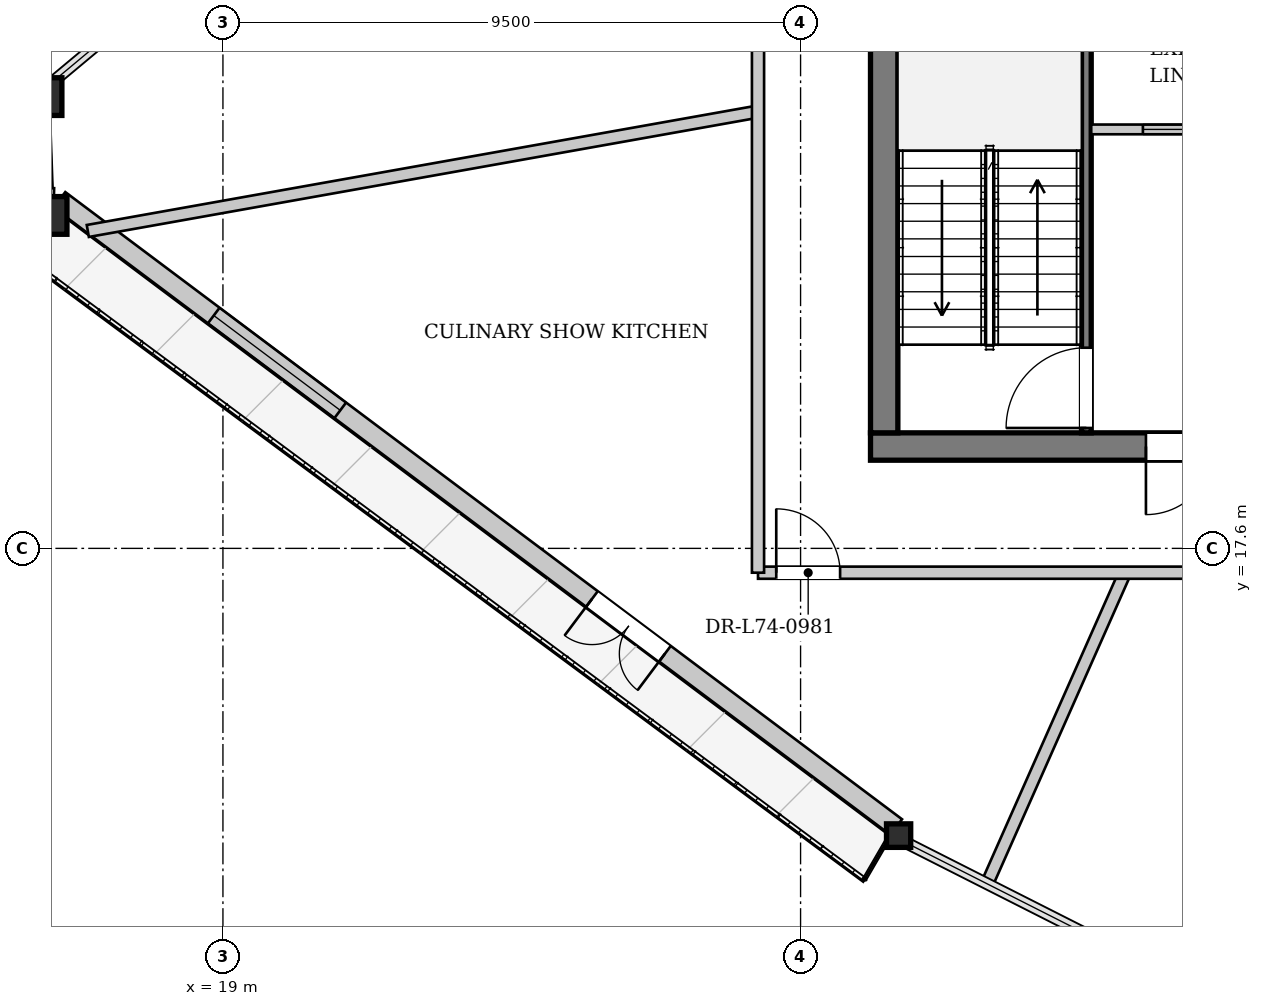
"""IFC4 building model, lengths in metres.
Left out: names, types, materials, properties, quantities, classifications, styles, units other than length and angle.
Written with IfcOpenShell. Run it as: python <this file> out.ifc"""

import sys

from ifc_helpers import new_model, si_unit, direction, frame, frame_2d, origin, origin_2d, place, context, subcontext, project, spatial, rectangle, i_section, extrude, source, transform, mapped, element, fill, save


model = new_model("IFC4")
c1 = context("Model", 3, precision=1e-05, world=origin(), true_north=direction((0.0, 1.0)))
c2 = subcontext(c1, "Body", "Model", "MODEL_VIEW")
j1 = project(units=[si_unit("LENGTHUNIT", "METRE"), si_unit("PLANEANGLEUNIT", "RADIAN")], contexts=[c1])
p1 = place(None, origin())
s1 = spatial("IfcSite", under=j1, at=p1, CompositionType="ELEMENT")
p2 = place(p1, origin())
s2 = spatial("IfcBuilding", under=s1, at=p2, CompositionType="ELEMENT")
p3 = place(p2, frame((0.0, 0.0, 277.7)))
s3 = spatial("IfcBuildingStorey", under=s2, at=p3, CompositionType="ELEMENT", Elevation=277.7)
m1 = source(origin(), c2, "Body", "SweptSolid", [
    extrude(i_section(OverallWidth=0.305, OverallDepth=0.62, WebThickness=0.021, FlangeThickness=0.04, at=origin_2d()), origin(), (0.0, 0.0, 1.0), 3.956),
])
p4 = place(p3, frame((16.145, 25.227, 0.0), z_axis=(0.027522629563, -0.099661539784, 0.99464068002), x_axis=(0.963918716253, 0.266196747646, 0.0)))
e1 = element("IfcColumn", 1, at=p4, inside=s3, PredefinedType="COLUMN", context=c2, shape_type="MappedRepresentation", body=[
    mapped(m1, transform((0.0, 0.0, 0.0), x_axis=(1.0, 0.0, 0.0), y_axis=(0.0, 1.0, 0.0), z_axis=(0.0, 0.0, 1.0), scale=1.0)),
])
m2 = source(origin(), c2, "Body", "SweptSolid", [
    extrude(i_section(OverallWidth=0.305, OverallDepth=0.62, WebThickness=0.021, FlangeThickness=0.04, at=origin_2d()), origin(), (0.0, 0.0, 1.0), 3.946),
])
p5 = place(p3, frame((16.215, 23.204, 0.0), z_axis=(0.033907558739, -0.065092612761, 0.997302977647), x_axis=(0.886885299691, 0.461989680828, 0.0)))
e2 = element("IfcColumn", 2, at=p5, inside=s3, PredefinedType="COLUMN", context=c2, shape_type="MappedRepresentation", body=[
    mapped(m2, transform((0.0, 0.0, 0.0), x_axis=(1.0, 0.0, 0.0), y_axis=(0.0, 1.0, 0.0), z_axis=(0.0, 0.0, 1.0), scale=1.0)),
])
m3 = source(origin(), c2, "Body", "SweptSolid", [
    extrude(i_section(OverallWidth=0.398, OverallDepth=0.387, WebThickness=0.019, FlangeThickness=0.029, at=origin_2d()), origin(), (0.0, 0.0, 1.0), 3.945),
])
p6 = place(p3, frame((29.977, 12.889, 0.0), z_axis=(0.068826100896, -0.006560761416, 0.997607099135), x_axis=(0.094893585197, 0.995487422064, 0.0)))
e3 = element("IfcColumn", 3, at=p6, inside=s3, PredefinedType="COLUMN", context=c2, shape_type="MappedRepresentation", body=[
    mapped(m3, transform((0.0, 0.0, 0.0), x_axis=(1.0, 0.0, 0.0), y_axis=(0.0, 1.0, 0.0), z_axis=(0.0, 0.0, 1.0), scale=1.0)),
])
p7 = place(p3, frame((30.073, 13.017, 0.0), z_axis=(0.0, 0.0, 1.0), x_axis=(-0.800180538876, 0.599759206018, 0.0)))
e4 = element("IfcWall", 4, at=p7, inside=s3, PredefinedType="SOLIDWALL", context=c2, shape_type="SweptSolid", body=[
    extrude(rectangle(XDim=17.198, YDim=0.32, at=frame_2d((8.599, 0.0))), origin(), (0.0, 0.0, 1.0), 3.462),
])
p8 = place(p7, frame((4.753, 0.0, 0.0)))
e5 = element("IfcOpeningElement", 5, at=p8, cuts=e4, PredefinedType="OPENING", context=c2, shape_type="SweptSolid", body=[
    extrude(rectangle(XDim=1.5, YDim=2.3, at=frame_2d((0.75, 1.15))), frame((0.0, 0.17, 0.0), z_axis=(0.0, -1.0, 0.0), x_axis=(1.0, 0.0, 0.0)), (0.0, 0.0, 1.0), 0.34),
])
p9 = place(p7, frame((11.426, 0.0, 0.65)))
e6 = element("IfcOpeningElement", 6, at=p9, cuts=e4, PredefinedType="OPENING", context=c2, shape_type="SweptSolid", body=[
    extrude(rectangle(XDim=2.6, YDim=2.35, at=frame_2d((1.3, 1.175))), frame((0.0, 0.17, 0.0), z_axis=(0.0, -1.0, 0.0), x_axis=(1.0, 0.0, 0.0)), (0.0, 0.0, 1.0), 0.34),
])
p10 = place(p3, frame((16.219, 23.364, 0.0), z_axis=(0.0, 0.0, 1.0), x_axis=(-0.999633757941, 0.027061965649, 0.0)))
e7 = element("IfcWall", 7, at=p10, inside=s3, PredefinedType="SOLIDWALL", context=c2, shape_type="SweptSolid", body=[
    extrude(rectangle(XDim=2.355, YDim=0.32, at=frame_2d((1.177, 0.0))), origin(), (0.0, 0.0, 1.0), 3.462),
])
p11 = place(p3, frame((13.966, 23.146, 0.0), z_axis=(0.0, 0.0, 1.0), x_axis=(0.758861199742, 0.651252393106, 0.0)))
e8 = element("IfcWall", 8, at=p11, inside=s3, PredefinedType="SOLIDWALL", context=c2, shape_type="SweptSolid", body=[
    extrude(rectangle(XDim=3.008, YDim=0.32, at=frame_2d((1.504, 0.0))), origin(), (0.0, 0.0, 1.0), 3.462),
])
p12 = place(p3, frame((46.35, 19.275, 0.0), z_axis=(0.0, 0.0, 1.0), x_axis=(-1.0, 0.0, 0.0)))
e9 = element("IfcWall", 9, at=p12, inside=s3, PredefinedType="SHEAR", context=c2, shape_type="SweptSolid", body=[
    extrude(rectangle(XDim=16.7, YDim=0.45, at=frame_2d((8.35, 0.0))), origin(), (0.0, 0.0, 1.0), 3.92),
])
p13 = place(p12, frame((4.55, 0.0, 0.0)))
e10 = element("IfcOpeningElement", 10, at=p13, cuts=e9, PredefinedType="OPENING", context=c2, shape_type="SweptSolid", body=[
    extrude(rectangle(XDim=1.12, YDim=2.25, at=frame_2d((0.56, 1.125))), frame((0.0, 0.235, 0.0), z_axis=(0.0, -1.0, 0.0), x_axis=(1.0, 0.0, 0.0)), (0.0, 0.0, 1.0), 0.47),
])
p14 = place(p12, frame((11.05, 0.0, 0.0)))
e11 = element("IfcOpeningElement", 11, at=p14, cuts=e9, PredefinedType="OPENING", context=c2, shape_type="SweptSolid", body=[
    extrude(rectangle(XDim=1.12, YDim=2.25, at=frame_2d((0.56, 1.125))), frame((0.0, 0.235, 0.0), z_axis=(0.0, -1.0, 0.0), x_axis=(1.0, 0.0, 0.0)), (0.0, 0.0, 1.0), 0.47),
])
p15 = place(p3, frame((29.875, 19.5, 0.0), z_axis=(0.0, 0.0, 1.0), x_axis=(0.0, 1.0, 0.0)))
e12 = element("IfcWall", 12, at=p15, inside=s3, PredefinedType="SHEAR", context=c2, shape_type="SweptSolid", body=[
    extrude(rectangle(XDim=14.2, YDim=0.45, at=frame_2d((7.1, 0.0))), origin(), (0.0, 0.0, 1.0), 3.92),
])
p16 = place(p15, frame((7.42, 0.0, 0.0)))
e13 = element("IfcOpeningElement", 13, at=p16, cuts=e12, PredefinedType="OPENING", context=c2, shape_type="SweptSolid", body=[
    extrude(rectangle(XDim=1.6, YDim=2.2, at=frame_2d((0.8, 1.1))), frame((0.0, 0.235, 0.0), z_axis=(0.0, -1.0, 0.0), x_axis=(1.0, 0.0, 0.0)), (0.0, 0.0, 1.0), 0.47),
])
p17 = place(p3, frame((33.2, 19.5, 0.0), z_axis=(0.0, 0.0, 1.0), x_axis=(0.0, 1.0, 0.0)))
e14 = element("IfcWall", 14, at=p17, inside=s3, PredefinedType="PARTITIONING", context=c2, shape_type="SweptSolid", body=[
    extrude(rectangle(XDim=7.46, YDim=0.16, at=frame_2d((3.73, 0.0))), origin(), (0.0, 0.0, 1.0), 3.92),
])
p18 = place(p17, frame((0.08, 0.0, 0.0)))
e15 = element("IfcOpeningElement", 15, at=p18, cuts=e14, PredefinedType="OPENING", context=c2, shape_type="SweptSolid", body=[
    extrude(rectangle(XDim=1.32, YDim=2.2, at=frame_2d((0.66, 1.1))), frame((0.0, 0.09, 0.0), z_axis=(0.0, -1.0, 0.0), x_axis=(1.0, 0.0, 0.0)), (0.0, 0.0, 1.0), 0.18),
])
p19 = place(p3, frame((33.28, 24.49, 0.0), z_axis=(0.0, 0.0, 1.0), x_axis=(1.0, 0.0, 0.0)))
e16 = element("IfcWall", 16, at=p19, inside=s3, PredefinedType="PARTITIONING", context=c2, shape_type="SweptSolid", body=[
    extrude(rectangle(XDim=9.44, YDim=0.16, at=frame_2d((4.72, 0.0))), origin(), (0.0, 0.0, 1.0), 3.92),
])
p20 = place(p19, frame((0.85, 0.0, 0.95)))
e17 = element("IfcOpeningElement", 17, at=p20, cuts=e16, PredefinedType="OPENING", context=c2, shape_type="SweptSolid", body=[
    extrude(rectangle(XDim=1.4, YDim=1.8, at=frame_2d((0.7, 0.9))), frame((0.0, 0.09, 0.0), z_axis=(0.0, -1.0, 0.0), x_axis=(1.0, 0.0, 0.0)), (0.0, 0.0, 1.0), 0.18),
])
p21 = place(p3, frame((27.8, 24.783, 0.0), z_axis=(0.0, 0.0, 1.0), x_axis=(-0.98449973, -0.175386093036, 0.0)))
e18 = element("IfcWall", 18, at=p21, inside=s3, PredefinedType="PARTITIONING", context=c2, shape_type="SweptSolid", body=[
    extrude(rectangle(XDim=11.196, YDim=0.2, at=frame_2d((5.598, 0.0))), origin(), (0.0, 0.0, 1.0), 3.92),
])
p22 = place(p3, frame((33.834, 17.2, 0.0), z_axis=(0.0, 0.0, 1.0), x_axis=(-0.405145139192, -0.914252381014, 0.0)))
e19 = element("IfcWall", 19, at=p22, inside=s3, PredefinedType="PARTITIONING", context=c2, shape_type="SweptSolid", body=[
    extrude(rectangle(XDim=5.566, YDim=0.2, at=frame_2d((2.783, 0.0))), origin(), (0.0, 0.0, 1.0), 3.92),
])
p23 = place(p3, frame((27.8, 17.2, 0.0), z_axis=(0.0, 0.0, 1.0), x_axis=(1.0, 0.0, 0.0)))
e20 = element("IfcWall", 20, at=p23, inside=s3, PredefinedType="PARTITIONING", context=c2, shape_type="SweptSolid", body=[
    extrude(rectangle(XDim=20.4, YDim=0.2, at=frame_2d((10.2, 0.0))), origin(), (0.0, 0.0, 1.0), 3.92),
])
p24 = place(p23, frame((0.3, 0.0, 0.0)))
e21 = element("IfcOpeningElement", 21, at=p24, cuts=e20, PredefinedType="OPENING", context=c2, shape_type="SweptSolid", body=[
    extrude(rectangle(XDim=1.05, YDim=2.2, at=frame_2d((0.525, 1.1))), frame((0.0, 0.11, 0.0), z_axis=(0.0, -1.0, 0.0), x_axis=(1.0, 0.0, 0.0)), (0.0, 0.0, 1.0), 0.22),
])
p25 = place(p23, frame((11.805, 0.0, 0.0)))
e22 = element("IfcOpeningElement", 22, at=p25, cuts=e20, PredefinedType="OPENING", context=c2, shape_type="SweptSolid", body=[
    extrude(rectangle(XDim=1.05, YDim=2.2, at=frame_2d((0.525, 1.1))), frame((0.0, 0.11, 0.0), z_axis=(0.0, -1.0, 0.0), x_axis=(1.0, 0.0, 0.0)), (0.0, 0.0, 1.0), 0.22),
])
p26 = place(p23, frame((19.05, 0.0, 0.0)))
e23 = element("IfcOpeningElement", 23, at=p26, cuts=e20, PredefinedType="OPENING", context=c2, shape_type="SweptSolid", body=[
    extrude(rectangle(XDim=1.05, YDim=2.2, at=frame_2d((0.525, 1.1))), frame((0.0, 0.11, 0.0), z_axis=(0.0, -1.0, 0.0), x_axis=(1.0, 0.0, 0.0)), (0.0, 0.0, 1.0), 0.22),
])
p27 = place(p3, frame((27.8, 17.2, 0.0), z_axis=(0.0, 0.0, 1.0), x_axis=(0.0, 1.0, 0.0)))
e24 = element("IfcWall", 24, at=p27, inside=s3, PredefinedType="PARTITIONING", context=c2, shape_type="SweptSolid", body=[
    extrude(rectangle(XDim=17.714, YDim=0.2, at=frame_2d((8.857, 0.0))), origin(), (0.0, 0.0, 1.0), 3.92),
])
p28 = place(p27, frame((11.972, 0.0, 0.0)))
e25 = element("IfcOpeningElement", 25, at=p28, cuts=e24, PredefinedType="OPENING", context=c2, shape_type="SweptSolid", body=[
    extrude(rectangle(XDim=1.05, YDim=2.2, at=frame_2d((0.525, 1.1))), frame((0.0, 0.11, 0.0), z_axis=(0.0, -1.0, 0.0), x_axis=(1.0, 0.0, 0.0)), (0.0, 0.0, 1.0), 0.22),
])
m4 = source(origin(), c2, "Body", "SweptSolid", [
    extrude(rectangle(XDim=1.5, YDim=2.3, at=frame_2d((0.75, 1.15))), frame((0.0, 0.025, 0.0), z_axis=(0.0, -1.0, 0.0), x_axis=(1.0, 0.0, 0.0)), (0.0, 0.0, 1.0), 0.05),
])
p29 = place(p8, origin())
e26 = element("IfcDoor", 26, at=p29, inside=s3, OperationType="DOUBLE_DOOR_SINGLE_SWING", PredefinedType="DOOR", context=c2, shape_type="MappedRepresentation", body=[
    mapped(m4, transform((0.0, 0.0, 0.0), x_axis=(1.0, 0.0, 0.0), y_axis=(0.0, 1.0, 0.0), z_axis=(0.0, 0.0, 1.0), scale=1.0)),
])
fill(e5, e26)
m5 = source(origin(), c2, "Body", "SweptSolid", [
    extrude(rectangle(XDim=2.6, YDim=2.35, at=frame_2d((1.3, 1.175))), frame((0.0, 0.03, 0.0), z_axis=(0.0, -1.0, 0.0), x_axis=(1.0, 0.0, 0.0)), (0.0, 0.0, 1.0), 0.06),
])
p30 = place(p9, origin())
e27 = element("IfcWindow", 27, at=p30, inside=s3, PartitioningType="SINGLE_PANEL", PredefinedType="WINDOW", context=c2, shape_type="MappedRepresentation", body=[
    mapped(m5, transform((0.0, 0.0, 0.0), x_axis=(1.0, 0.0, 0.0), y_axis=(0.0, 1.0, 0.0), z_axis=(0.0, 0.0, 1.0), scale=1.0)),
])
fill(e6, e27)
m6 = source(origin(), c2, "Body", "SweptSolid", [
    extrude(rectangle(XDim=1.12, YDim=2.25, at=frame_2d((0.56, 1.125))), frame((0.0, 0.025, 0.0), z_axis=(0.0, -1.0, 0.0), x_axis=(1.0, 0.0, 0.0)), (0.0, 0.0, 1.0), 0.05),
])
p31 = place(p14, origin())
e28 = element("IfcDoor", 28, at=p31, inside=s3, OperationType="SINGLE_SWING_RIGHT", PredefinedType="DOOR", context=c2, shape_type="MappedRepresentation", body=[
    mapped(m6, transform((0.0, 0.0, 0.0), x_axis=(1.0, 0.0, 0.0), y_axis=(0.0, 1.0, 0.0), z_axis=(0.0, 0.0, 1.0), scale=1.0)),
])
fill(e11, e28)
m7 = source(origin(), c2, "Body", "SweptSolid", [
    extrude(rectangle(XDim=1.32, YDim=2.2, at=frame_2d((0.66, 1.1))), frame((0.0, 0.025, 0.0), z_axis=(0.0, -1.0, 0.0), x_axis=(1.0, 0.0, 0.0)), (0.0, 0.0, 1.0), 0.05),
])
p32 = place(p18, origin())
e29 = element("IfcDoor", 29, at=p32, inside=s3, OperationType="SINGLE_SWING_LEFT", PredefinedType="DOOR", context=c2, shape_type="MappedRepresentation", body=[
    mapped(m7, transform((0.0, 0.0, 0.0), x_axis=(1.0, 0.0, 0.0), y_axis=(0.0, 1.0, 0.0), z_axis=(0.0, 0.0, 1.0), scale=1.0)),
])
fill(e15, e29)
m8 = source(origin(), c2, "Body", "SweptSolid", [
    extrude(rectangle(XDim=1.05, YDim=2.2, at=frame_2d((0.525, 1.1))), frame((0.0, 0.025, 0.0), z_axis=(0.0, -1.0, 0.0), x_axis=(1.0, 0.0, 0.0)), (0.0, 0.0, 1.0), 0.05),
])
p33 = place(p24, origin())
e30 = element("IfcDoor", 30, at=p33, inside=s3, OperationType="SINGLE_SWING_LEFT", PredefinedType="DOOR", context=c2, shape_type="MappedRepresentation", body=[
    mapped(m8, transform((0.0, 0.0, 0.0), x_axis=(1.0, 0.0, 0.0), y_axis=(0.0, 1.0, 0.0), z_axis=(0.0, 0.0, 1.0), scale=1.0)),
])
fill(e21, e30)
m9 = source(origin(), c2, "Body", "SweptSolid", [
    extrude(rectangle(XDim=1.4, YDim=1.8, at=frame_2d((0.7, 0.9))), frame((0.0, 0.03, 0.0), z_axis=(0.0, -1.0, 0.0), x_axis=(1.0, 0.0, 0.0)), (0.0, 0.0, 1.0), 0.06),
])
p34 = place(p20, origin())
e31 = element("IfcWindow", 31, at=p34, inside=s3, PartitioningType="SINGLE_PANEL", PredefinedType="WINDOW", context=c2, shape_type="MappedRepresentation", body=[
    mapped(m9, transform((0.0, 0.0, 0.0), x_axis=(1.0, 0.0, 0.0), y_axis=(0.0, 1.0, 0.0), z_axis=(0.0, 0.0, 1.0), scale=1.0)),
])
fill(e17, e31)
save(model, sys.argv[1])
